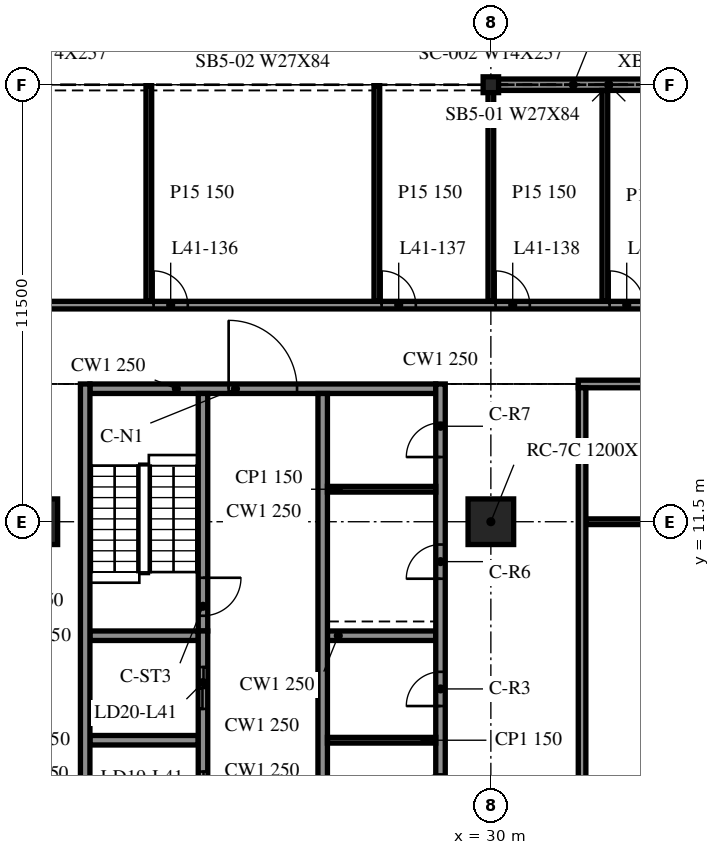
"""IFC4 building model, lengths in metres.
Left out: names, types, materials, properties, quantities, classifications, styles, units other than length and angle.
Written with IfcOpenShell. Run it as: python <this file> out.ifc"""

import sys

from ifc_helpers import new_model, si_unit, direction, frame, frame_2d, origin, origin_2d, place, context, subcontext, project, spatial, rectangle, i_section, extrude, element, fill, save


model = new_model("IFC4")
c1 = context("Model", 3, precision=1e-05, world=origin(), true_north=direction((0.0, 1.0)))
c2 = subcontext(c1, "Body", "Model", "MODEL_VIEW")
j1 = project(units=[si_unit("LENGTHUNIT", "METRE"), si_unit("PLANEANGLEUNIT", "RADIAN")], contexts=[c1])
p1 = place(None, origin())
s1 = spatial("IfcSite", under=j1, at=p1, CompositionType="ELEMENT")
p2 = place(p1, origin())
s2 = spatial("IfcBuilding", under=s1, at=p2, CompositionType="ELEMENT")
p3 = place(p2, frame((0.0, 0.0, 174.4)))
s3 = spatial("IfcBuildingStorey", under=s2, at=p3, CompositionType="ELEMENT", Elevation=174.4)
for number, where, z_axis, x_axis in (
    (1, (18.0, 11.5, -0.34), (0.0, 0.0, 1.0), (1.0, 0.0, 0.0)),
    (2, (30.0, 11.5, -0.34), (0.0, 0.0, 1.0), (1.0, 0.0, 0.0)),
):
    element("IfcColumn", number, at=place(p3, frame(where, z_axis=z_axis, x_axis=x_axis)), inside=s3, PredefinedType="COLUMN", context=c2, shape_type="SweptSolid", body=[
        extrude(rectangle(XDim=1.2, YDim=1.2, at=origin_2d()), origin(), (0.0, 0.0, 1.0), 3.8),
    ])
p4 = place(p3, frame((30.0, 23.0, -0.34), z_axis=(0.0, 0.0, 1.0), x_axis=(1.0, 0.0, 0.0)))
e3 = element("IfcColumn", 3, at=p4, inside=s3, PredefinedType="COLUMN", context=c2, shape_type="SweptSolid", body=[
    extrude(i_section(OverallWidth=0.406, OverallDepth=0.417, WebThickness=0.03, FlangeThickness=0.048, at=origin_2d()), origin(), (0.0, 0.0, 1.0), 3.8),
])
p5 = place(p3, frame((41.985, 23.0, 0.0), z_axis=(0.0, 0.0, 1.0), x_axis=(-1.0, 0.0, 0.0)))
e4 = element("IfcWall", 4, at=p5, inside=s3, PredefinedType="NOTDEFINED", context=c2, shape_type="SweptSolid", body=[
    extrude(rectangle(XDim=11.97, YDim=0.3, at=frame_2d((5.985, 0.0))), origin(), (0.0, 0.0, 1.0), 2.782),
])
p6 = place(p3, frame((19.325, 15.125, 0.0), z_axis=(0.0, 0.0, 1.0), x_axis=(0.0, -1.0, 0.0)))
e5 = element("IfcWall", 5, at=p6, inside=s3, PredefinedType="SOLIDWALL", context=c2, shape_type="SweptSolid", body=[
    extrude(rectangle(XDim=24.25, YDim=0.25, at=frame_2d((12.125, 0.0))), origin(), (0.0, 0.0, 1.0), 3.46),
])
p7 = place(p3, frame((28.675, -9.125, 0.0), z_axis=(0.0, 0.0, 1.0), x_axis=(0.0, 1.0, 0.0)))
e6 = element("IfcWall", 6, at=p7, inside=s3, PredefinedType="SOLIDWALL", context=c2, shape_type="SweptSolid", body=[
    extrude(rectangle(XDim=24.25, YDim=0.25, at=frame_2d((12.125, 0.0))), origin(), (0.0, 0.0, 1.0), 3.46),
])
p8 = place(p7, frame((13.075, 0.0, 0.0)))
e7 = element("IfcOpeningElement", 7, at=p8, cuts=e6, PredefinedType="OPENING", context=c2, shape_type="SweptSolid", body=[
    extrude(rectangle(XDim=0.9, YDim=2.1, at=frame_2d((0.45, 1.05))), frame((0.0, 0.135, 0.0), z_axis=(0.0, -1.0, 0.0), x_axis=(1.0, 0.0, 0.0)), (0.0, 0.0, 1.0), 0.27),
])
p9 = place(p7, frame((15.775, 0.0, 0.0)))
e8 = element("IfcOpeningElement", 8, at=p9, cuts=e6, PredefinedType="OPENING", context=c2, shape_type="SweptSolid", body=[
    extrude(rectangle(XDim=0.9, YDim=2.1, at=frame_2d((0.45, 1.05))), frame((0.0, 0.135, 0.0), z_axis=(0.0, -1.0, 0.0), x_axis=(1.0, 0.0, 0.0)), (0.0, 0.0, 1.0), 0.27),
])
p10 = place(p7, frame((19.125, 0.0, 0.0)))
e9 = element("IfcOpeningElement", 9, at=p10, cuts=e6, PredefinedType="OPENING", context=c2, shape_type="SweptSolid", body=[
    extrude(rectangle(XDim=0.9, YDim=2.1, at=frame_2d((0.45, 1.05))), frame((0.0, 0.135, 0.0), z_axis=(0.0, -1.0, 0.0), x_axis=(1.0, 0.0, 0.0)), (0.0, 0.0, 1.0), 0.27),
])
p11 = place(p7, frame((22.327, 0.0, 0.0)))
e10 = element("IfcOpeningElement", 10, at=p11, cuts=e6, PredefinedType="OPENING", context=c2, shape_type="SweptSolid", body=[
    extrude(rectangle(XDim=0.9, YDim=2.1, at=frame_2d((0.45, 1.05))), frame((0.0, 0.135, 0.0), z_axis=(0.0, -1.0, 0.0), x_axis=(1.0, 0.0, 0.0)), (0.0, 0.0, 1.0), 0.27),
])
p12 = place(p3, frame((19.45, 15.0, 0.0), z_axis=(0.0, 0.0, 1.0), x_axis=(1.0, 0.0, 0.0)))
e11 = element("IfcWall", 11, at=p12, inside=s3, PredefinedType="SOLIDWALL", context=c2, shape_type="SweptSolid", body=[
    extrude(rectangle(XDim=9.1, YDim=0.25, at=frame_2d((4.55, 0.0))), origin(), (0.0, 0.0, 1.0), 3.46),
])
p13 = place(p12, frame((3.65, 0.0, 0.0)))
e12 = element("IfcOpeningElement", 12, at=p13, cuts=e11, PredefinedType="OPENING", context=c2, shape_type="SweptSolid", body=[
    extrude(rectangle(XDim=1.8, YDim=2.1, at=frame_2d((0.9, 1.05))), frame((0.0, 0.135, 0.0), z_axis=(0.0, -1.0, 0.0), x_axis=(1.0, 0.0, 0.0)), (0.0, 0.0, 1.0), 0.27),
])
p14 = place(p3, frame((22.425, -8.875, 0.0), z_axis=(0.0, 0.0, 1.0), x_axis=(0.0, 1.0, 0.0)))
e13 = element("IfcWall", 13, at=p14, inside=s3, PredefinedType="SOLIDWALL", context=c2, shape_type="SweptSolid", body=[
    extrude(rectangle(XDim=17.5, YDim=0.25, at=frame_2d((8.75, 0.0))), origin(), (0.0, 0.0, 1.0), 3.46),
])
p15 = place(p14, frame((7.2, 0.0, 0.0)))
e14 = element("IfcOpeningElement", 14, at=p15, cuts=e13, PredefinedType="OPENING", context=c2, shape_type="SweptSolid", body=[
    extrude(rectangle(XDim=1.1, YDim=2.1, at=frame_2d((0.55, 1.05))), frame((0.0, 0.135, 0.0), z_axis=(0.0, -1.0, 0.0), x_axis=(1.0, 0.0, 0.0)), (0.0, 0.0, 1.0), 0.27),
])
p16 = place(p14, frame((9.95, 0.0, 0.0)))
e15 = element("IfcOpeningElement", 15, at=p16, cuts=e13, PredefinedType="OPENING", context=c2, shape_type="SweptSolid", body=[
    extrude(rectangle(XDim=1.1, YDim=2.1, at=frame_2d((0.55, 1.05))), frame((0.0, 0.135, 0.0), z_axis=(0.0, -1.0, 0.0), x_axis=(1.0, 0.0, 0.0)), (0.0, 0.0, 1.0), 0.27),
])
p17 = place(p14, frame((12.7, 0.0, 0.0)))
e16 = element("IfcOpeningElement", 16, at=p17, cuts=e13, PredefinedType="OPENING", context=c2, shape_type="SweptSolid", body=[
    extrude(rectangle(XDim=1.1, YDim=2.1, at=frame_2d((0.55, 1.05))), frame((0.0, 0.135, 0.0), z_axis=(0.0, -1.0, 0.0), x_axis=(1.0, 0.0, 0.0)), (0.0, 0.0, 1.0), 0.27),
])
p18 = place(p14, frame((15.45, 0.0, 0.0)))
e17 = element("IfcOpeningElement", 17, at=p18, cuts=e13, PredefinedType="OPENING", context=c2, shape_type="SweptSolid", body=[
    extrude(rectangle(XDim=1.1, YDim=2.1, at=frame_2d((0.55, 1.05))), frame((0.0, 0.135, 0.0), z_axis=(0.0, -1.0, 0.0), x_axis=(1.0, 0.0, 0.0)), (0.0, 0.0, 1.0), 0.27),
])
p19 = place(p14, frame((0.512, 0.0, 0.0)))
e18 = element("IfcOpeningElement", 18, at=p19, cuts=e13, PredefinedType="OPENING", context=c2, shape_type="SweptSolid", body=[
    extrude(rectangle(XDim=0.9, YDim=2.1, at=frame_2d((0.45, 1.05))), frame((0.0, 0.135, 0.0), z_axis=(0.0, -1.0, 0.0), x_axis=(1.0, 0.0, 0.0)), (0.0, 0.0, 1.0), 0.27),
])
p20 = place(p14, frame((3.587, 0.0, 0.0)))
e19 = element("IfcOpeningElement", 19, at=p20, cuts=e13, PredefinedType="OPENING", context=c2, shape_type="SweptSolid", body=[
    extrude(rectangle(XDim=0.9, YDim=2.1, at=frame_2d((0.45, 1.05))), frame((0.0, 0.135, 0.0), z_axis=(0.0, -1.0, 0.0), x_axis=(1.0, 0.0, 0.0)), (0.0, 0.0, 1.0), 0.27),
])
p21 = place(p3, frame((22.425, 14.875, 0.0), z_axis=(0.0, 0.0, 1.0), x_axis=(0.0, -1.0, 0.0)))
e20 = element("IfcWall", 20, at=p21, inside=s3, PredefinedType="SOLIDWALL", context=c2, shape_type="SweptSolid", body=[
    extrude(rectangle(XDim=6.25, YDim=0.25, at=frame_2d((3.125, 0.0))), origin(), (0.0, 0.0, 1.0), 3.46),
])
p22 = place(p21, frame((4.85, 0.0, 0.0)))
e21 = element("IfcOpeningElement", 21, at=p22, cuts=e20, PredefinedType="OPENING", context=c2, shape_type="SweptSolid", body=[
    extrude(rectangle(XDim=1.0, YDim=2.1, at=frame_2d((0.5, 1.05))), frame((0.0, 0.135, 0.0), z_axis=(0.0, -1.0, 0.0), x_axis=(1.0, 0.0, 0.0)), (0.0, 0.0, 1.0), 0.27),
])
p23 = place(p3, frame((25.575, 14.875, 0.0), z_axis=(0.0, 0.0, 1.0), x_axis=(0.0, -1.0, 0.0)))
e22 = element("IfcWall", 22, at=p23, inside=s3, PredefinedType="SOLIDWALL", context=c2, shape_type="SweptSolid", body=[
    extrude(rectangle(XDim=17.5, YDim=0.25, at=frame_2d((8.75, 0.0))), origin(), (0.0, 0.0, 1.0), 3.46),
])
p24 = place(p23, frame((15.45, 0.0, 0.0)))
e23 = element("IfcOpeningElement", 23, at=p24, cuts=e22, PredefinedType="OPENING", context=c2, shape_type="SweptSolid", body=[
    extrude(rectangle(XDim=1.1, YDim=2.1, at=frame_2d((0.55, 1.05))), frame((0.0, 0.135, 0.0), z_axis=(0.0, -1.0, 0.0), x_axis=(1.0, 0.0, 0.0)), (0.0, 0.0, 1.0), 0.27),
])
p25 = place(p23, frame((12.8, 0.0, 0.0)))
e24 = element("IfcOpeningElement", 24, at=p25, cuts=e22, PredefinedType="OPENING", context=c2, shape_type="SweptSolid", body=[
    extrude(rectangle(XDim=0.9, YDim=2.1, at=frame_2d((0.45, 1.05))), frame((0.0, 0.135, 0.0), z_axis=(0.0, -1.0, 0.0), x_axis=(1.0, 0.0, 0.0)), (0.0, 0.0, 1.0), 0.27),
])
for number, where, z_axis, x_axis in (
    (25, (19.45, 5.75, 0.0), (0.0, 0.0, 1.0), (1.0, 0.0, 0.0)),
    (26, (19.45, 8.5, 0.0), (0.0, 0.0, 1.0), (1.0, 0.0, 0.0)),
    (27, (25.7, 8.5, 0.0), (0.0, 0.0, 1.0), (1.0, 0.0, 0.0)),
):
    element("IfcWall", number, at=place(p3, frame(where, z_axis=z_axis, x_axis=x_axis)), inside=s3, PredefinedType="SOLIDWALL", context=c2, shape_type="SweptSolid", body=[
        extrude(rectangle(XDim=2.85, YDim=0.25, at=frame_2d((1.425, 0.0))), origin(), (0.0, 0.0, 1.0), 3.46),
    ])
for number, where, z_axis, x_axis in (
    (28, (25.7, 5.75, 0.0), (0.0, 0.0, 1.0), (1.0, 0.0, 0.0)),
    (29, (25.7, 12.355, 0.0), (0.0, 0.0, 1.0), (1.0, 0.0, 0.0)),
):
    element("IfcWall", number, at=place(p3, frame(where, z_axis=z_axis, x_axis=x_axis)), inside=s3, PredefinedType="PARTITIONING", context=c2, shape_type="SweptSolid", body=[
        extrude(rectangle(XDim=2.85, YDim=0.15, at=frame_2d((1.425, 0.0))), origin(), (0.0, 0.0, 1.0), 3.46),
    ])
p26 = place(p3, frame((32.5, 11.5, 0.0), z_axis=(0.0, 0.0, 1.0), x_axis=(1.0, 0.0, 0.0)))
e30 = element("IfcWall", 30, at=p26, inside=s3, PredefinedType="PARTITIONING", context=c2, shape_type="SweptSolid", body=[
    extrude(rectangle(XDim=8.9, YDim=0.15, at=frame_2d((4.45, 0.0))), origin(), (0.0, 0.0, 1.0), 3.46),
])
p27 = place(p3, frame((32.3, 15.125, 0.0), z_axis=(0.0, 0.0, 1.0), x_axis=(1.0, 0.0, 0.0)))
e31 = element("IfcWall", 31, at=p27, inside=s3, PredefinedType="PARTITIONING", context=c2, shape_type="SweptSolid", body=[
    extrude(rectangle(XDim=15.675, YDim=0.2, at=frame_2d((7.837, 0.0))), origin(), (0.0, 0.0, 1.0), 3.46),
])
p28 = place(p27, frame((7.3, 0.0, 0.0)))
e32 = element("IfcOpeningElement", 32, at=p28, cuts=e31, PredefinedType="OPENING", context=c2, shape_type="SweptSolid", body=[
    extrude(rectangle(XDim=1.0, YDim=2.1, at=frame_2d((0.5, 1.05))), frame((0.0, 0.11, 0.0), z_axis=(0.0, -1.0, 0.0), x_axis=(1.0, 0.0, 0.0)), (0.0, 0.0, 1.0), 0.22),
])
p29 = place(p3, frame((-47.975, 17.2, 0.0), z_axis=(0.0, 0.0, 1.0), x_axis=(1.0, 0.0, 0.0)))
e33 = element("IfcWall", 33, at=p29, inside=s3, PredefinedType="PARTITIONING", context=c2, shape_type="SweptSolid", body=[
    extrude(rectangle(XDim=95.95, YDim=0.2, at=frame_2d((47.975, 0.0))), origin(), (0.0, 0.0, 1.0), 3.46),
])
p30 = place(p29, frame((13.7, 0.0, 0.0)))
e34 = element("IfcOpeningElement", 34, at=p30, cuts=e33, PredefinedType="OPENING", context=c2, shape_type="SweptSolid", body=[
    extrude(rectangle(XDim=0.9, YDim=2.1, at=frame_2d((0.45, 1.05))), frame((0.0, 0.11, 0.0), z_axis=(0.0, -1.0, 0.0), x_axis=(1.0, 0.0, 0.0)), (0.0, 0.0, 1.0), 0.22),
])
p31 = place(p29, frame((19.7, 0.0, 0.0)))
e35 = element("IfcOpeningElement", 35, at=p31, cuts=e33, PredefinedType="OPENING", context=c2, shape_type="SweptSolid", body=[
    extrude(rectangle(XDim=0.9, YDim=2.1, at=frame_2d((0.45, 1.05))), frame((0.0, 0.11, 0.0), z_axis=(0.0, -1.0, 0.0), x_axis=(1.0, 0.0, 0.0)), (0.0, 0.0, 1.0), 0.22),
])
p32 = place(p29, frame((23.1, 0.0, 0.0)))
e36 = element("IfcOpeningElement", 36, at=p32, cuts=e33, PredefinedType="OPENING", context=c2, shape_type="SweptSolid", body=[
    extrude(rectangle(XDim=0.9, YDim=2.1, at=frame_2d((0.45, 1.05))), frame((0.0, 0.11, 0.0), z_axis=(0.0, -1.0, 0.0), x_axis=(1.0, 0.0, 0.0)), (0.0, 0.0, 1.0), 0.22),
])
p33 = place(p29, frame((25.7, 0.0, 0.0)))
e37 = element("IfcOpeningElement", 37, at=p33, cuts=e33, PredefinedType="OPENING", context=c2, shape_type="SweptSolid", body=[
    extrude(rectangle(XDim=0.9, YDim=2.1, at=frame_2d((0.45, 1.05))), frame((0.0, 0.11, 0.0), z_axis=(0.0, -1.0, 0.0), x_axis=(1.0, 0.0, 0.0)), (0.0, 0.0, 1.0), 0.22),
])
p34 = place(p29, frame((40.7, 0.0, 0.0)))
e38 = element("IfcOpeningElement", 38, at=p34, cuts=e33, PredefinedType="OPENING", context=c2, shape_type="SweptSolid", body=[
    extrude(rectangle(XDim=0.9, YDim=2.1, at=frame_2d((0.45, 1.05))), frame((0.0, 0.11, 0.0), z_axis=(0.0, -1.0, 0.0), x_axis=(1.0, 0.0, 0.0)), (0.0, 0.0, 1.0), 0.22),
])
p35 = place(p29, frame((46.7, 0.0, 0.0)))
e39 = element("IfcOpeningElement", 39, at=p35, cuts=e33, PredefinedType="OPENING", context=c2, shape_type="SweptSolid", body=[
    extrude(rectangle(XDim=0.9, YDim=2.1, at=frame_2d((0.45, 1.05))), frame((0.0, 0.11, 0.0), z_axis=(0.0, -1.0, 0.0), x_axis=(1.0, 0.0, 0.0)), (0.0, 0.0, 1.0), 0.22),
])
p36 = place(p29, frame((48.1, 0.0, 0.0)))
e40 = element("IfcOpeningElement", 40, at=p36, cuts=e33, PredefinedType="OPENING", context=c2, shape_type="SweptSolid", body=[
    extrude(rectangle(XDim=0.9, YDim=2.1, at=frame_2d((0.45, 1.05))), frame((0.0, 0.11, 0.0), z_axis=(0.0, -1.0, 0.0), x_axis=(1.0, 0.0, 0.0)), (0.0, 0.0, 1.0), 0.22),
])
p37 = place(p29, frame((51.5, 0.0, 0.0)))
e41 = element("IfcOpeningElement", 41, at=p37, cuts=e33, PredefinedType="OPENING", context=c2, shape_type="SweptSolid", body=[
    extrude(rectangle(XDim=0.9, YDim=2.1, at=frame_2d((0.45, 1.05))), frame((0.0, 0.11, 0.0), z_axis=(0.0, -1.0, 0.0), x_axis=(1.0, 0.0, 0.0)), (0.0, 0.0, 1.0), 0.22),
])
p38 = place(p29, frame((54.5, 0.0, 0.0)))
e42 = element("IfcOpeningElement", 42, at=p38, cuts=e33, PredefinedType="OPENING", context=c2, shape_type="SweptSolid", body=[
    extrude(rectangle(XDim=0.9, YDim=2.1, at=frame_2d((0.45, 1.05))), frame((0.0, 0.11, 0.0), z_axis=(0.0, -1.0, 0.0), x_axis=(1.0, 0.0, 0.0)), (0.0, 0.0, 1.0), 0.22),
])
p39 = place(p29, frame((69.1, 0.0, 0.0)))
e43 = element("IfcOpeningElement", 43, at=p39, cuts=e33, PredefinedType="OPENING", context=c2, shape_type="SweptSolid", body=[
    extrude(rectangle(XDim=0.9, YDim=2.1, at=frame_2d((0.45, 1.05))), frame((0.0, 0.11, 0.0), z_axis=(0.0, -1.0, 0.0), x_axis=(1.0, 0.0, 0.0)), (0.0, 0.0, 1.0), 0.22),
])
p40 = place(p29, frame((75.1, 0.0, 0.0)))
e44 = element("IfcOpeningElement", 44, at=p40, cuts=e33, PredefinedType="OPENING", context=c2, shape_type="SweptSolid", body=[
    extrude(rectangle(XDim=0.9, YDim=2.1, at=frame_2d((0.45, 1.05))), frame((0.0, 0.11, 0.0), z_axis=(0.0, -1.0, 0.0), x_axis=(1.0, 0.0, 0.0)), (0.0, 0.0, 1.0), 0.22),
])
p41 = place(p29, frame((78.1, 0.0, 0.0)))
e45 = element("IfcOpeningElement", 45, at=p41, cuts=e33, PredefinedType="OPENING", context=c2, shape_type="SweptSolid", body=[
    extrude(rectangle(XDim=0.9, YDim=2.1, at=frame_2d((0.45, 1.05))), frame((0.0, 0.11, 0.0), z_axis=(0.0, -1.0, 0.0), x_axis=(1.0, 0.0, 0.0)), (0.0, 0.0, 1.0), 0.22),
])
p42 = place(p29, frame((81.1, 0.0, 0.0)))
e46 = element("IfcOpeningElement", 46, at=p42, cuts=e33, PredefinedType="OPENING", context=c2, shape_type="SweptSolid", body=[
    extrude(rectangle(XDim=0.9, YDim=2.1, at=frame_2d((0.45, 1.05))), frame((0.0, 0.11, 0.0), z_axis=(0.0, -1.0, 0.0), x_axis=(1.0, 0.0, 0.0)), (0.0, 0.0, 1.0), 0.22),
])
for number, where, z_axis, x_axis in (
    (47, (21.0, 17.3, 0.0), (0.0, 0.0, 1.0), (0.0, 1.0, 0.0)),
    (48, (27.0, 17.3, 0.0), (0.0, 0.0, 1.0), (0.0, 1.0, 0.0)),
    (49, (30.0, 17.3, 0.0), (0.0, 0.0, 1.0), (0.0, 1.0, 0.0)),
):
    element("IfcWall", number, at=place(p3, frame(where, z_axis=z_axis, x_axis=x_axis)), inside=s3, PredefinedType="PARTITIONING", context=c2, shape_type="SweptSolid", body=[
        extrude(rectangle(XDim=5.675, YDim=0.15, at=frame_2d((2.837, 0.0))), origin(), (0.0, 0.0, 1.0), 3.46),
    ])
p43 = place(p3, frame((32.4, -9.025, 0.0), z_axis=(0.0, 0.0, 1.0), x_axis=(0.0, 1.0, 0.0)))
e50 = element("IfcWall", 50, at=p43, inside=s3, PredefinedType="PARTITIONING", context=c2, shape_type="SweptSolid", body=[
    extrude(rectangle(XDim=24.05, YDim=0.2, at=frame_2d((12.025, 0.0))), origin(), (0.0, 0.0, 1.0), 3.46),
])
p44 = place(p43, frame((11.5, 0.0, 0.0)))
e51 = element("IfcOpeningElement", 51, at=p44, cuts=e50, PredefinedType="OPENING", context=c2, shape_type="SweptSolid", body=[
    extrude(rectangle(XDim=1.0, YDim=2.1, at=frame_2d((0.5, 1.05))), frame((0.0, 0.11, 0.0), z_axis=(0.0, -1.0, 0.0), x_axis=(1.0, 0.0, 0.0)), (0.0, 0.0, 1.0), 0.22),
])
p45 = place(p3, frame((33.0, 17.3, 0.0), z_axis=(0.0, 0.0, 1.0), x_axis=(0.0, 1.0, 0.0)))
e52 = element("IfcWall", 52, at=p45, inside=s3, PredefinedType="PARTITIONING", context=c2, shape_type="SweptSolid", body=[
    extrude(rectangle(XDim=5.55, YDim=0.15, at=frame_2d((2.775, 0.0))), origin(), (0.0, 0.0, 1.0), 3.46),
])
p46 = place(p13, origin())
e53 = element("IfcDoor", 53, at=p46, inside=s3, OperationType="DOUBLE_DOOR_SINGLE_SWING", PredefinedType="DOOR", context=c2, shape_type="SweptSolid", body=[
    extrude(rectangle(XDim=1.8, YDim=2.1, at=frame_2d((0.9, 1.05))), frame((0.0, 0.025, 0.0), z_axis=(0.0, -1.0, 0.0), x_axis=(1.0, 0.0, 0.0)), (0.0, 0.0, 1.0), 0.05),
])
fill(e12, e53)
p47 = place(p17, origin())
e54 = element("IfcDoor", 54, at=p47, inside=s3, OperationType="DOUBLE_DOOR_SLIDING", PredefinedType="DOOR", context=c2, shape_type="SweptSolid", body=[
    extrude(rectangle(XDim=1.1, YDim=2.1, at=frame_2d((0.55, 1.05))), frame((0.0, 0.025, 0.0), z_axis=(0.0, -1.0, 0.0), x_axis=(1.0, 0.0, 0.0)), (0.0, 0.0, 1.0), 0.05),
])
fill(e16, e54)
p48 = place(p18, origin())
e55 = element("IfcDoor", 55, at=p48, inside=s3, OperationType="DOUBLE_DOOR_SLIDING", PredefinedType="DOOR", context=c2, shape_type="SweptSolid", body=[
    extrude(rectangle(XDim=1.1, YDim=2.1, at=frame_2d((0.55, 1.05))), frame((0.0, 0.025, 0.0), z_axis=(0.0, -1.0, 0.0), x_axis=(1.0, 0.0, 0.0)), (0.0, 0.0, 1.0), 0.05),
])
fill(e17, e55)
p49 = place(p8, origin())
e56 = element("IfcDoor", 56, at=p49, inside=s3, OperationType="SINGLE_SWING_RIGHT", PredefinedType="DOOR", context=c2, shape_type="SweptSolid", body=[
    extrude(rectangle(XDim=0.9, YDim=2.1, at=frame_2d((0.45, 1.05))), frame((0.0, 0.025, 0.0), z_axis=(0.0, -1.0, 0.0), x_axis=(1.0, 0.0, 0.0)), (0.0, 0.0, 1.0), 0.05),
])
fill(e7, e56)
p50 = place(p9, origin())
e57 = element("IfcDoor", 57, at=p50, inside=s3, OperationType="SINGLE_SWING_LEFT", PredefinedType="DOOR", context=c2, shape_type="SweptSolid", body=[
    extrude(rectangle(XDim=0.9, YDim=2.1, at=frame_2d((0.45, 1.05))), frame((0.0, 0.025, 0.0), z_axis=(0.0, -1.0, 0.0), x_axis=(1.0, 0.0, 0.0)), (0.0, 0.0, 1.0), 0.05),
])
fill(e8, e57)
p51 = place(p10, origin())
e58 = element("IfcDoor", 58, at=p51, inside=s3, OperationType="SINGLE_SWING_RIGHT", PredefinedType="DOOR", context=c2, shape_type="SweptSolid", body=[
    extrude(rectangle(XDim=0.9, YDim=2.1, at=frame_2d((0.45, 1.05))), frame((0.0, 0.025, 0.0), z_axis=(0.0, -1.0, 0.0), x_axis=(1.0, 0.0, 0.0)), (0.0, 0.0, 1.0), 0.05),
])
fill(e9, e58)
p52 = place(p11, origin())
e59 = element("IfcDoor", 59, at=p52, inside=s3, OperationType="SINGLE_SWING_LEFT", PredefinedType="DOOR", context=c2, shape_type="SweptSolid", body=[
    extrude(rectangle(XDim=0.9, YDim=2.1, at=frame_2d((0.45, 1.05))), frame((0.0, 0.025, 0.0), z_axis=(0.0, -1.0, 0.0), x_axis=(1.0, 0.0, 0.0)), (0.0, 0.0, 1.0), 0.05),
])
fill(e10, e59)
p53 = place(p22, origin())
e60 = element("IfcDoor", 60, at=p53, inside=s3, OperationType="SINGLE_SWING_RIGHT", PredefinedType="DOOR", context=c2, shape_type="SweptSolid", body=[
    extrude(rectangle(XDim=1.0, YDim=2.1, at=frame_2d((0.5, 1.05))), frame((0.0, 0.025, 0.0), z_axis=(0.0, -1.0, 0.0), x_axis=(1.0, 0.0, 0.0)), (0.0, 0.0, 1.0), 0.05),
])
fill(e21, e60)
p54 = place(p39, origin())
e61 = element("IfcDoor", 61, at=p54, inside=s3, OperationType="SINGLE_SWING_RIGHT", PredefinedType="DOOR", context=c2, shape_type="SweptSolid", body=[
    extrude(rectangle(XDim=0.9, YDim=2.1, at=frame_2d((0.45, 1.05))), frame((0.0, 0.025, 0.0), z_axis=(0.0, -1.0, 0.0), x_axis=(1.0, 0.0, 0.0)), (0.0, 0.0, 1.0), 0.05),
])
fill(e43, e61)
p55 = place(p40, origin())
e62 = element("IfcDoor", 62, at=p55, inside=s3, OperationType="SINGLE_SWING_RIGHT", PredefinedType="DOOR", context=c2, shape_type="SweptSolid", body=[
    extrude(rectangle(XDim=0.9, YDim=2.1, at=frame_2d((0.45, 1.05))), frame((0.0, 0.025, 0.0), z_axis=(0.0, -1.0, 0.0), x_axis=(1.0, 0.0, 0.0)), (0.0, 0.0, 1.0), 0.05),
])
fill(e44, e62)
p56 = place(p41, origin())
e63 = element("IfcDoor", 63, at=p56, inside=s3, OperationType="SINGLE_SWING_RIGHT", PredefinedType="DOOR", context=c2, shape_type="SweptSolid", body=[
    extrude(rectangle(XDim=0.9, YDim=2.1, at=frame_2d((0.45, 1.05))), frame((0.0, 0.025, 0.0), z_axis=(0.0, -1.0, 0.0), x_axis=(1.0, 0.0, 0.0)), (0.0, 0.0, 1.0), 0.05),
])
fill(e45, e63)
p57 = place(p42, origin())
e64 = element("IfcDoor", 64, at=p57, inside=s3, OperationType="SINGLE_SWING_RIGHT", PredefinedType="DOOR", context=c2, shape_type="SweptSolid", body=[
    extrude(rectangle(XDim=0.9, YDim=2.1, at=frame_2d((0.45, 1.05))), frame((0.0, 0.025, 0.0), z_axis=(0.0, -1.0, 0.0), x_axis=(1.0, 0.0, 0.0)), (0.0, 0.0, 1.0), 0.05),
])
fill(e46, e64)
save(model, sys.argv[1])
